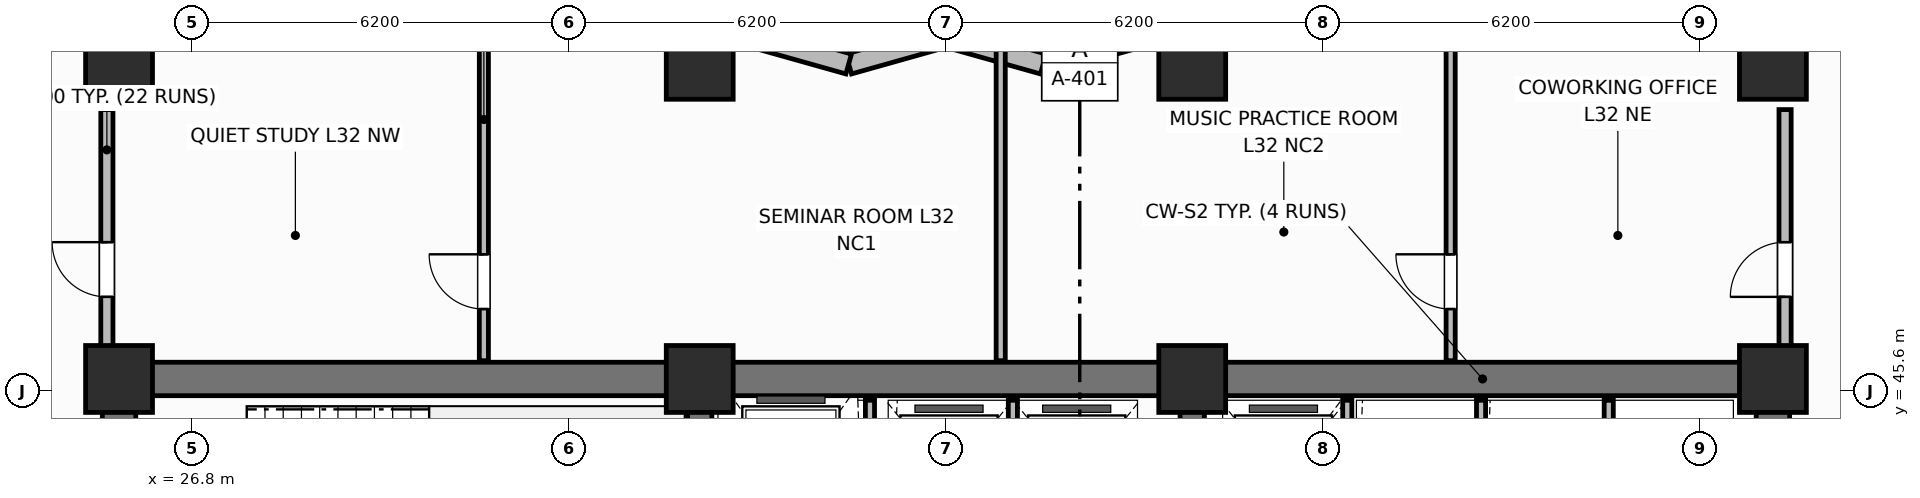
"""IFC4 building model, lengths in metres.
Left out: names, types, materials, properties, quantities, classifications, styles, units other than length and angle.
Written with IfcOpenShell. Run it as: python <this file> out.ifc"""

import sys

from ifc_helpers import new_model, si_unit, direction, frame, frame_2d, origin, origin_2d, place, context, subcontext, project, spatial, rectangle, extrude, element, fill, save


model = new_model("IFC4")
c1 = context("Model", 3, precision=1e-05, world=origin(), true_north=direction((0.0, 1.0)))
c2 = subcontext(c1, "Body", "Model", "MODEL_VIEW")
j1 = project(units=[si_unit("LENGTHUNIT", "METRE"), si_unit("PLANEANGLEUNIT", "RADIAN")], contexts=[c1])
p1 = place(None, origin())
s1 = spatial("IfcSite", under=j1, at=p1, CompositionType="ELEMENT")
p2 = place(p1, origin())
s2 = spatial("IfcBuilding", under=s1, at=p2, CompositionType="ELEMENT")
p3 = place(p2, frame((0.0, 0.0, 129.0)))
s3 = spatial("IfcBuildingStorey", under=s2, at=p3, CompositionType="ELEMENT", Elevation=129.0)
p4 = place(p3, frame((25.6, 45.8, 0.0), z_axis=(0.0, 0.0, 1.0), x_axis=(1.0, 0.0, 0.0)))
e1 = element("IfcWall", 1, at=p4, inside=s3, PredefinedType="SHEAR", context=c2, shape_type="SweptSolid", body=[
    extrude(rectangle(XDim=27.2, YDim=0.55, at=frame_2d((13.6, 0.0))), origin(), (0.0, 0.0, 1.0), 3.7),
])
for number, where, z_axis, x_axis in (
    (2, (25.6, 39.875, 0.0), (0.0, 0.0, 1.0), (0.0, 1.0, 0.0)),
    (3, (52.8, 39.875, 0.0), (0.0, 0.0, 1.0), (0.0, 1.0, 0.0)),
):
    element("IfcWall", number, at=place(p3, frame(where, z_axis=z_axis, x_axis=x_axis)), inside=s3, PredefinedType="SHEAR", context=c2, shape_type="SweptSolid", body=[
        extrude(rectangle(XDim=5.65, YDim=0.55, at=frame_2d((2.825, 0.0))), origin(), (0.0, 0.0, 1.0), 3.7),
    ])
for number, where, z_axis, x_axis in (
    (4, (35.15, 39.875, 0.0), (0.0, 0.0, 1.0), (0.0, 1.0, 0.0)),
    (5, (43.25, 39.875, 0.0), (0.0, 0.0, 1.0), (0.0, 1.0, 0.0)),
):
    element("IfcWall", number, at=place(p3, frame(where, z_axis=z_axis, x_axis=x_axis)), inside=s3, PredefinedType="SHEAR", context=c2, shape_type="SweptSolid", body=[
        extrude(rectangle(XDim=5.65, YDim=0.4, at=frame_2d((2.825, 0.0))), origin(), (0.0, 0.0, 1.0), 3.7),
    ])
for number, where, z_axis, x_axis in (
    (6, (25.6, 45.8, 0.0), (0.0, 0.0, 1.0), (1.0, 0.0, 0.0)),
    (7, (35.15, 45.8, 0.0), (0.0, 0.0, 1.0), (1.0, 0.0, 0.0)),
    (8, (43.25, 45.8, 0.0), (0.0, 0.0, 1.0), (1.0, 0.0, 0.0)),
    (9, (52.8, 45.8, 0.0), (0.0, 0.0, 1.0), (1.0, 0.0, 0.0)),
    (10, (25.6, 50.95, 0.0), (0.0, 0.0, 1.0), (1.0, 0.0, 0.0)),
    (11, (35.15, 50.95, 0.0), (0.0, 0.0, 1.0), (1.0, 0.0, 0.0)),
    (12, (43.25, 50.95, 0.0), (0.0, 0.0, 1.0), (1.0, 0.0, 0.0)),
    (13, (52.8, 50.95, 0.0), (0.0, 0.0, 1.0), (1.0, 0.0, 0.0)),
):
    element("IfcColumn", number, at=place(p3, frame(where, z_axis=z_axis, x_axis=x_axis)), inside=s3, PredefinedType="COLUMN", context=c2, shape_type="SweptSolid", body=[
        extrude(rectangle(XDim=1.1, YDim=1.1, at=origin_2d()), origin(), (0.0, 0.0, 1.0), 3.7),
    ])
p5 = place(p3, frame((42.4, 51.43, 0.0), z_axis=(0.0, 0.0, 1.0), x_axis=(-0.962652136636, -0.270741322725, 0.0)))
e14 = element("IfcWall", 14, at=p5, inside=s3, PredefinedType="SOLIDWALL", context=c2, shape_type="SweptSolid", body=[
    extrude(rectangle(XDim=1.662, YDim=0.34, at=frame_2d((0.831, 0.0))), origin(), (0.0, 0.0, 1.0), 2.7),
])
p6 = place(p3, frame((40.8, 50.98, 0.0), z_axis=(0.0, 0.0, 1.0), x_axis=(-0.962662902433, 0.270703040766, 0.0)))
e15 = element("IfcWall", 15, at=p6, inside=s3, PredefinedType="SOLIDWALL", context=c2, shape_type="SweptSolid", body=[
    extrude(rectangle(XDim=1.662, YDim=0.34, at=frame_2d((0.831, 0.0))), origin(), (0.0, 0.0, 1.0), 2.7),
])
p7 = place(p3, frame((39.2, 51.43, 0.0), z_axis=(0.0, 0.0, 1.0), x_axis=(-0.962652136636, -0.270741322725, 0.0)))
e16 = element("IfcWall", 16, at=p7, inside=s3, PredefinedType="SOLIDWALL", context=c2, shape_type="SweptSolid", body=[
    extrude(rectangle(XDim=1.662, YDim=0.34, at=frame_2d((0.831, 0.0))), origin(), (0.0, 0.0, 1.0), 2.7),
])
p8 = place(p3, frame((37.6, 50.98, 0.0), z_axis=(0.0, 0.0, 1.0), x_axis=(-0.962662902433, 0.270703040766, 0.0)))
e17 = element("IfcWall", 17, at=p8, inside=s3, PredefinedType="SOLIDWALL", context=c2, shape_type="SweptSolid", body=[
    extrude(rectangle(XDim=1.662, YDim=0.34, at=frame_2d((0.831, 0.0))), origin(), (0.0, 0.0, 1.0), 2.7),
])
p9 = place(p3, frame((37.95, 42.6, 0.0), z_axis=(0.0, 0.0, 1.0), x_axis=(0.0, 1.0, 0.0)))
e18 = element("IfcWall", 18, at=p9, inside=s3, PredefinedType="PARTITIONING", context=c2, shape_type="SweptSolid", body=[
    extrude(rectangle(XDim=2.85, YDim=0.15, at=frame_2d((1.425, 0.0))), origin(), (0.0, 0.0, 1.0), 2.53),
])
for number, where, z_axis, x_axis in (
    (19, (40.3, 42.65, 0.0), (0.0, 0.0, 1.0), (0.0, 1.0, 0.0)),
    (20, (45.8, 42.65, 0.0), (0.0, 0.0, 1.0), (0.0, 1.0, 0.0)),
    (21, (48.0, 42.65, 0.0), (0.0, 0.0, 1.0), (0.0, 1.0, 0.0)),
    (22, (50.1, 42.65, 0.0), (0.0, 0.0, 1.0), (0.0, 1.0, 0.0)),
):
    element("IfcWall", number, at=place(p3, frame(where, z_axis=z_axis, x_axis=x_axis)), inside=s3, PredefinedType="PARTITIONING", context=c2, shape_type="SweptSolid", body=[
        extrude(rectangle(XDim=2.8, YDim=0.15, at=frame_2d((1.4, 0.0))), origin(), (0.0, 0.0, 1.0), 2.53),
    ])
p10 = place(p3, frame((31.6, 46.1, 0.0), z_axis=(0.0, 0.0, 1.0), x_axis=(0.0, 1.0, 0.0)))
e23 = element("IfcWall", 23, at=p10, inside=s3, PredefinedType="PARTITIONING", context=c2, shape_type="SweptSolid", body=[
    extrude(rectangle(XDim=5.33, YDim=0.15, at=frame_2d((2.665, 0.0))), origin(), (0.0, 0.0, 1.0), 2.53),
])
p11 = place(p10, frame((0.85, 0.0, 0.0)))
e24 = element("IfcOpeningElement", 24, at=p11, cuts=e23, PredefinedType="OPENING", context=c2, shape_type="SweptSolid", body=[
    extrude(rectangle(XDim=0.9, YDim=2.1, at=frame_2d((0.45, 1.05))), frame((0.0, 0.085, 0.0), z_axis=(0.0, -1.0, 0.0), x_axis=(1.0, 0.0, 0.0)), (0.0, 0.0, 1.0), 0.17),
])
p12 = place(p3, frame((40.1, 46.1, 0.0), z_axis=(0.0, 0.0, 1.0), x_axis=(0.0, 1.0, 0.0)))
e25 = element("IfcWall", 25, at=p12, inside=s3, PredefinedType="PARTITIONING", context=c2, shape_type="SweptSolid", body=[
    extrude(rectangle(XDim=5.33, YDim=0.15, at=frame_2d((2.665, 0.0))), origin(), (0.0, 0.0, 1.0), 2.53),
])
p13 = place(p3, frame((47.5, 46.1, 0.0), z_axis=(0.0, 0.0, 1.0), x_axis=(0.0, 1.0, 0.0)))
e26 = element("IfcWall", 26, at=p13, inside=s3, PredefinedType="PARTITIONING", context=c2, shape_type="SweptSolid", body=[
    extrude(rectangle(XDim=5.33, YDim=0.15, at=frame_2d((2.665, 0.0))), origin(), (0.0, 0.0, 1.0), 2.53),
])
p14 = place(p13, frame((0.85, 0.0, 0.0)))
e27 = element("IfcOpeningElement", 27, at=p14, cuts=e26, PredefinedType="OPENING", context=c2, shape_type="SweptSolid", body=[
    extrude(rectangle(XDim=0.9, YDim=2.1, at=frame_2d((0.45, 1.05))), frame((0.0, 0.085, 0.0), z_axis=(0.0, -1.0, 0.0), x_axis=(1.0, 0.0, 0.0)), (0.0, 0.0, 1.0), 0.17),
])
p15 = place(p3, frame((25.4, 46.1, 0.0), z_axis=(0.0, 0.0, 1.0), x_axis=(0.0, 1.0, 0.0)))
e28 = element("IfcWall", 28, at=p15, inside=s3, PredefinedType="PARTITIONING", context=c2, shape_type="SweptSolid", body=[
    extrude(rectangle(XDim=4.13, YDim=0.2, at=frame_2d((2.065, 0.0))), origin(), (0.0, 0.0, 1.0), 2.53),
])
p16 = place(p15, frame((1.05, 0.0, 0.0)))
e29 = element("IfcOpeningElement", 29, at=p16, cuts=e28, PredefinedType="OPENING", context=c2, shape_type="SweptSolid", body=[
    extrude(rectangle(XDim=0.9, YDim=2.1, at=frame_2d((0.45, 1.05))), frame((0.0, 0.11, 0.0), z_axis=(0.0, -1.0, 0.0), x_axis=(1.0, 0.0, 0.0)), (0.0, 0.0, 1.0), 0.22),
])
p17 = place(p3, frame((53.0, 46.1, 0.0), z_axis=(0.0, 0.0, 1.0), x_axis=(0.0, 1.0, 0.0)))
e30 = element("IfcWall", 30, at=p17, inside=s3, PredefinedType="PARTITIONING", context=c2, shape_type="SweptSolid", body=[
    extrude(rectangle(XDim=4.13, YDim=0.2, at=frame_2d((2.065, 0.0))), origin(), (0.0, 0.0, 1.0), 2.53),
])
p18 = place(p17, frame((1.05, 0.0, 0.0)))
e31 = element("IfcOpeningElement", 31, at=p18, cuts=e30, PredefinedType="OPENING", context=c2, shape_type="SweptSolid", body=[
    extrude(rectangle(XDim=0.9, YDim=2.1, at=frame_2d((0.45, 1.05))), frame((0.0, 0.11, 0.0), z_axis=(0.0, -1.0, 0.0), x_axis=(1.0, 0.0, 0.0)), (0.0, 0.0, 1.0), 0.22),
])
p19 = place(p11, origin())
e32 = element("IfcDoor", 32, at=p19, inside=s3, OperationType="SINGLE_SWING_RIGHT", PredefinedType="DOOR", context=c2, shape_type="SweptSolid", body=[
    extrude(rectangle(XDim=0.9, YDim=2.1, at=frame_2d((0.45, 1.05))), frame((0.0, 0.025, 0.0), z_axis=(0.0, -1.0, 0.0), x_axis=(1.0, 0.0, 0.0)), (0.0, 0.0, 1.0), 0.05),
])
fill(e24, e32)
p20 = place(p14, origin())
e33 = element("IfcDoor", 33, at=p20, inside=s3, OperationType="SINGLE_SWING_RIGHT", PredefinedType="DOOR", context=c2, shape_type="SweptSolid", body=[
    extrude(rectangle(XDim=0.9, YDim=2.1, at=frame_2d((0.45, 1.05))), frame((0.0, 0.025, 0.0), z_axis=(0.0, -1.0, 0.0), x_axis=(1.0, 0.0, 0.0)), (0.0, 0.0, 1.0), 0.05),
])
fill(e27, e33)
p21 = place(p16, origin())
e34 = element("IfcDoor", 34, at=p21, inside=s3, OperationType="SINGLE_SWING_RIGHT", PredefinedType="DOOR", context=c2, shape_type="SweptSolid", body=[
    extrude(rectangle(XDim=0.9, YDim=2.1, at=frame_2d((0.45, 1.05))), frame((0.0, 0.025, 0.0), z_axis=(0.0, -1.0, 0.0), x_axis=(1.0, 0.0, 0.0)), (0.0, 0.0, 1.0), 0.05),
])
fill(e29, e34)
p22 = place(p18, origin())
e35 = element("IfcDoor", 35, at=p22, inside=s3, OperationType="SINGLE_SWING_LEFT", PredefinedType="DOOR", context=c2, shape_type="SweptSolid", body=[
    extrude(rectangle(XDim=0.9, YDim=2.1, at=frame_2d((0.45, 1.05))), frame((0.0, 0.025, 0.0), z_axis=(0.0, -1.0, 0.0), x_axis=(1.0, 0.0, 0.0)), (0.0, 0.0, 1.0), 0.05),
])
fill(e31, e35)
save(model, sys.argv[1])
